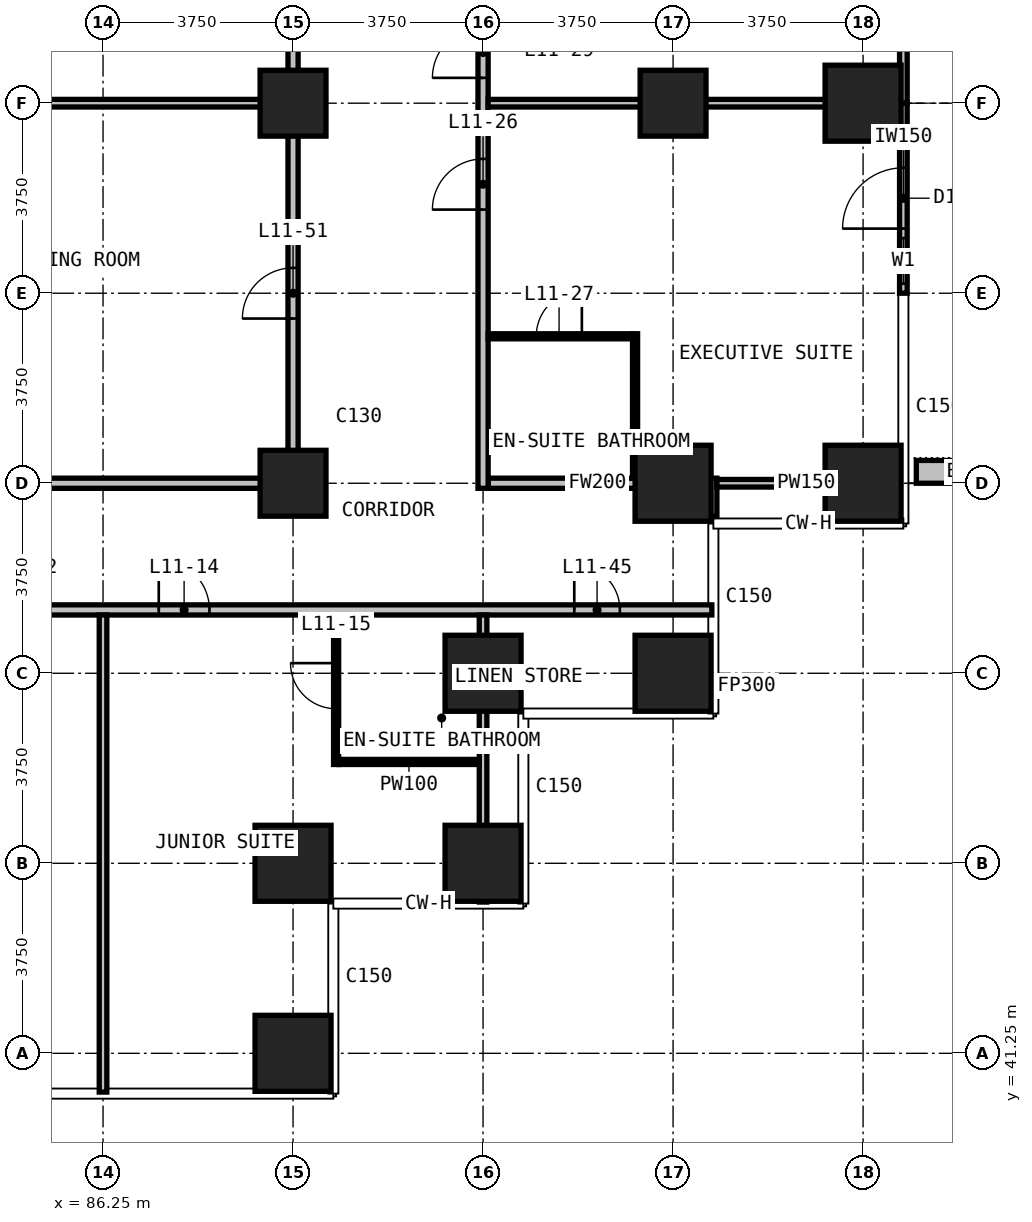
"""IFC4 building model, lengths in metres.
Left out: names, types, materials, properties, quantities, classifications, styles, units other than length and angle.
Written with IfcOpenShell. Run it as: python <this file> out.ifc"""

import sys

from ifc_helpers import new_model, si_unit, direction, frame, frame_2d, origin, origin_2d, place, context, subcontext, project, spatial, rectangle, extrude, element, fill, save


model = new_model("IFC4")
c1 = context("Model", 3, precision=1e-05, world=origin(), true_north=direction((0.0, 1.0)))
c2 = subcontext(c1, "Body", "Model", "MODEL_VIEW")
j1 = project(units=[si_unit("LENGTHUNIT", "METRE"), si_unit("PLANEANGLEUNIT", "RADIAN")], contexts=[c1])
p1 = place(None, origin())
s1 = spatial("IfcSite", under=j1, at=p1, CompositionType="ELEMENT")
p2 = place(p1, origin())
s2 = spatial("IfcBuilding", under=s1, at=p2, CompositionType="ELEMENT")
p3 = place(p2, frame((0.0, 0.0, 56.0)))
s3 = spatial("IfcBuildingStorey", under=s2, at=p3, CompositionType="ELEMENT", Elevation=56.0)
for number, where, z_axis, x_axis in (
    (1, (90.0, 41.25, 0.0), (0.0, 0.0, 1.0), (1.0, 0.0, 0.0)),
    (2, (90.0, 45.0, 0.0), (0.0, 0.0, 1.0), (1.0, 0.0, 0.0)),
):
    element("IfcColumn", number, at=place(p3, frame(where, z_axis=z_axis, x_axis=x_axis)), inside=s3, PredefinedType="COLUMN", context=c2, shape_type="SweptSolid", body=[
        extrude(rectangle(XDim=1.5, YDim=1.5, at=origin_2d()), origin(), (0.0, 0.0, 1.0), 3.3),
    ])
for number, where, z_axis, x_axis in (
    (3, (90.0, 52.5, 0.0), (0.0, 0.0, 1.0), (1.0, 0.0, 0.0)),
    (4, (90.0, 60.0, 0.0), (0.0, 0.0, 1.0), (1.0, 0.0, 0.0)),
):
    element("IfcColumn", number, at=place(p3, frame(where, z_axis=z_axis, x_axis=x_axis)), inside=s3, PredefinedType="COLUMN", context=c2, shape_type="SweptSolid", body=[
        extrude(rectangle(XDim=1.3, YDim=1.3, at=origin_2d()), origin(), (0.0, 0.0, 1.0), 3.3),
    ])
for number, where, z_axis, x_axis in (
    (5, (93.75, 45.0, 0.0), (0.0, 0.0, 1.0), (1.0, 0.0, 0.0)),
    (6, (93.75, 48.75, 0.0), (0.0, 0.0, 1.0), (1.0, 0.0, 0.0)),
    (7, (97.5, 48.75, 0.0), (0.0, 0.0, 1.0), (1.0, 0.0, 0.0)),
    (8, (97.5, 52.5, 0.0), (0.0, 0.0, 1.0), (1.0, 0.0, 0.0)),
):
    element("IfcColumn", number, at=place(p3, frame(where, z_axis=z_axis, x_axis=x_axis)), inside=s3, PredefinedType="COLUMN", context=c2, shape_type="SweptSolid", body=[
        extrude(rectangle(XDim=1.5, YDim=1.5, at=origin_2d()), origin(), (0.0, 0.0, 1.0), 3.3),
    ])
p4 = place(p3, frame((97.5, 60.0, 0.0), z_axis=(0.0, 0.0, 1.0), x_axis=(1.0, 0.0, 0.0)))
e9 = element("IfcColumn", 9, at=p4, inside=s3, PredefinedType="COLUMN", context=c2, shape_type="SweptSolid", body=[
    extrude(rectangle(XDim=1.3, YDim=1.3, at=origin_2d()), origin(), (0.0, 0.0, 1.0), 3.3),
])
for number, where, z_axis, x_axis in (
    (10, (101.25, 52.5, 0.0), (0.0, 0.0, 1.0), (1.0, 0.0, 0.0)),
    (11, (101.25, 60.0, 0.0), (0.0, 0.0, 1.0), (1.0, 0.0, 0.0)),
):
    element("IfcColumn", number, at=place(p3, frame(where, z_axis=z_axis, x_axis=x_axis)), inside=s3, PredefinedType="COLUMN", context=c2, shape_type="SweptSolid", body=[
        extrude(rectangle(XDim=1.5, YDim=1.5, at=origin_2d()), origin(), (0.0, 0.0, 1.0), 3.3),
    ])
p5 = place(p3, frame((102.045, 56.25, 0.0), z_axis=(0.0, 0.0, 1.0), x_axis=(0.0, 1.0, 0.0)))
e12 = element("IfcWall", 12, at=p5, inside=s3, PredefinedType="SOLIDWALL", context=c2, shape_type="SweptSolid", body=[
    extrude(rectangle(XDim=3.75, YDim=0.15, at=frame_2d((1.875, 0.0))), origin(), (0.0, 0.0, 1.0), 3.0),
])
p6 = place(p5, frame((0.188, 0.0, 0.1)))
e13 = element("IfcOpeningElement", 13, at=p6, cuts=e12, PredefinedType="OPENING", context=c2, shape_type="SweptSolid", body=[
    extrude(rectangle(XDim=0.9, YDim=2.4, at=frame_2d((0.45, 1.2))), frame((0.0, 0.085, 0.0), z_axis=(0.0, -1.0, 0.0), x_axis=(1.0, 0.0, 0.0)), (0.0, 0.0, 1.0), 0.17),
])
p7 = place(p5, frame((1.275, 0.0, 0.0)))
e14 = element("IfcOpeningElement", 14, at=p7, cuts=e12, PredefinedType="OPENING", context=c2, shape_type="SweptSolid", body=[
    extrude(rectangle(XDim=1.2, YDim=2.4, at=frame_2d((0.6, 1.2))), frame((0.0, 0.085, 0.0), z_axis=(0.0, -1.0, 0.0), x_axis=(1.0, 0.0, 0.0)), (0.0, 0.0, 1.0), 0.17),
])
p8 = place(p3, frame((102.045, 60.0, 0.0), z_axis=(0.0, 0.0, 1.0), x_axis=(0.0, 1.0, 0.0)))
e15 = element("IfcWall", 15, at=p8, inside=s3, PredefinedType="SOLIDWALL", context=c2, shape_type="SweptSolid", body=[
    extrude(rectangle(XDim=3.75, YDim=0.15, at=frame_2d((1.875, 0.0))), origin(), (0.0, 0.0, 1.0), 3.0),
])
p9 = place(p8, frame((1.275, 0.0, 0.0)))
e16 = element("IfcOpeningElement", 16, at=p9, cuts=e15, PredefinedType="OPENING", context=c2, shape_type="SweptSolid", body=[
    extrude(rectangle(XDim=1.2, YDim=2.4, at=frame_2d((0.6, 1.2))), frame((0.0, 0.085, 0.0), z_axis=(0.0, -1.0, 0.0), x_axis=(1.0, 0.0, 0.0)), (0.0, 0.0, 1.0), 0.17),
])
p10 = place(p8, frame((2.663, 0.0, 0.1)))
e17 = element("IfcOpeningElement", 17, at=p10, cuts=e15, PredefinedType="OPENING", context=c2, shape_type="SweptSolid", body=[
    extrude(rectangle(XDim=0.9, YDim=2.4, at=frame_2d((0.45, 1.2))), frame((0.0, 0.085, 0.0), z_axis=(0.0, -1.0, 0.0), x_axis=(1.0, 0.0, 0.0)), (0.0, 0.0, 1.0), 0.17),
])
p11 = place(p3, frame((102.3, 52.725, 0.0), z_axis=(0.0, 0.0, 1.0), x_axis=(1.0, 0.0, 0.0)))
e18 = element("IfcWall", 18, at=p11, inside=s3, PredefinedType="USERDEFINED", context=c2, shape_type="SweptSolid", body=[
    extrude(rectangle(XDim=2.35, YDim=0.45, at=frame_2d((1.175, 0.0))), origin(), (0.0, 0.0, 1.0), 1.1),
])
p12 = place(p3, frame((51.735, 50.0, 0.0), z_axis=(0.0, 0.0, 1.0), x_axis=(1.0, 0.0, 0.0)))
e19 = element("IfcWall", 19, at=p12, inside=s3, PredefinedType="PARTITIONING", context=c2, shape_type="SweptSolid", body=[
    extrude(rectangle(XDim=46.53, YDim=0.2, at=frame_2d((23.265, 0.0))), origin(), (0.0, 0.0, 1.0), 3.0),
])
p13 = place(p12, frame((5.615, 0.0, 0.0)))
e20 = element("IfcOpeningElement", 20, at=p13, cuts=e19, PredefinedType="OPENING", context=c2, shape_type="SweptSolid", body=[
    extrude(rectangle(XDim=1.0, YDim=2.2, at=frame_2d((0.5, 1.1))), frame((0.0, 0.11, 0.0), z_axis=(0.0, -1.0, 0.0), x_axis=(1.0, 0.0, 0.0)), (0.0, 0.0, 1.0), 0.22),
])
p14 = place(p12, frame((17.415, 0.0, 0.0)))
e21 = element("IfcOpeningElement", 21, at=p14, cuts=e19, PredefinedType="OPENING", context=c2, shape_type="SweptSolid", body=[
    extrude(rectangle(XDim=1.0, YDim=2.2, at=frame_2d((0.5, 1.1))), frame((0.0, 0.11, 0.0), z_axis=(0.0, -1.0, 0.0), x_axis=(1.0, 0.0, 0.0)), (0.0, 0.0, 1.0), 0.22),
])
p15 = place(p12, frame((20.615, 0.0, 0.0)))
e22 = element("IfcOpeningElement", 22, at=p15, cuts=e19, PredefinedType="OPENING", context=c2, shape_type="SweptSolid", body=[
    extrude(rectangle(XDim=1.0, YDim=2.2, at=frame_2d((0.5, 1.1))), frame((0.0, 0.11, 0.0), z_axis=(0.0, -1.0, 0.0), x_axis=(1.0, 0.0, 0.0)), (0.0, 0.0, 1.0), 0.22),
])
p16 = place(p12, frame((32.415, 0.0, 0.0)))
e23 = element("IfcOpeningElement", 23, at=p16, cuts=e19, PredefinedType="OPENING", context=c2, shape_type="SweptSolid", body=[
    extrude(rectangle(XDim=1.0, YDim=2.2, at=frame_2d((0.5, 1.1))), frame((0.0, 0.11, 0.0), z_axis=(0.0, -1.0, 0.0), x_axis=(1.0, 0.0, 0.0)), (0.0, 0.0, 1.0), 0.22),
])
p17 = place(p12, frame((35.615, 0.0, 0.0)))
e24 = element("IfcOpeningElement", 24, at=p17, cuts=e19, PredefinedType="OPENING", context=c2, shape_type="SweptSolid", body=[
    extrude(rectangle(XDim=1.0, YDim=2.2, at=frame_2d((0.5, 1.1))), frame((0.0, 0.11, 0.0), z_axis=(0.0, -1.0, 0.0), x_axis=(1.0, 0.0, 0.0)), (0.0, 0.0, 1.0), 0.22),
])
p18 = place(p12, frame((1.8, 0.0, 0.0)))
e25 = element("IfcOpeningElement", 25, at=p18, cuts=e19, PredefinedType="OPENING", context=c2, shape_type="SweptSolid", body=[
    extrude(rectangle(XDim=0.9, YDim=2.2, at=frame_2d((0.45, 1.1))), frame((0.0, 0.11, 0.0), z_axis=(0.0, -1.0, 0.0), x_axis=(1.0, 0.0, 0.0)), (0.0, 0.0, 1.0), 0.22),
])
p19 = place(p12, frame((43.815, 0.0, 0.0)))
e26 = element("IfcOpeningElement", 26, at=p19, cuts=e19, PredefinedType="OPENING", context=c2, shape_type="SweptSolid", body=[
    extrude(rectangle(XDim=0.9, YDim=2.2, at=frame_2d((0.45, 1.1))), frame((0.0, 0.11, 0.0), z_axis=(0.0, -1.0, 0.0), x_axis=(1.0, 0.0, 0.0)), (0.0, 0.0, 1.0), 0.22),
])
p20 = place(p3, frame((60.1, 52.5, 0.0), z_axis=(0.0, 0.0, 1.0), x_axis=(1.0, 0.0, 0.0)))
e27 = element("IfcWall", 27, at=p20, inside=s3, PredefinedType="PARTITIONING", context=c2, shape_type="SweptSolid", body=[
    extrude(rectangle(XDim=29.8, YDim=0.2, at=frame_2d((14.9, 0.0))), origin(), (0.0, 0.0, 1.0), 3.0),
])
p21 = place(p20, frame((10.65, 0.0, 0.0)))
e28 = element("IfcOpeningElement", 28, at=p21, cuts=e27, PredefinedType="OPENING", context=c2, shape_type="SweptSolid", body=[
    extrude(rectangle(XDim=1.0, YDim=2.2, at=frame_2d((0.5, 1.1))), frame((0.0, 0.11, 0.0), z_axis=(0.0, -1.0, 0.0), x_axis=(1.0, 0.0, 0.0)), (0.0, 0.0, 1.0), 0.22),
])
p22 = place(p20, frame((18.15, 0.0, 0.0)))
e29 = element("IfcOpeningElement", 29, at=p22, cuts=e27, PredefinedType="OPENING", context=c2, shape_type="SweptSolid", body=[
    extrude(rectangle(XDim=1.0, YDim=2.2, at=frame_2d((0.5, 1.1))), frame((0.0, 0.11, 0.0), z_axis=(0.0, -1.0, 0.0), x_axis=(1.0, 0.0, 0.0)), (0.0, 0.0, 1.0), 0.22),
])
p23 = place(p3, frame((93.85, 52.5, 0.0), z_axis=(0.0, 0.0, 1.0), x_axis=(1.0, 0.0, 0.0)))
e30 = element("IfcWall", 30, at=p23, inside=s3, PredefinedType="PARTITIONING", context=c2, shape_type="SweptSolid", body=[
    extrude(rectangle(XDim=4.315, YDim=0.2, at=frame_2d((2.157, 0.0))), origin(), (0.0, 0.0, 1.0), 3.0),
])
p24 = place(p3, frame((90.0, 52.4, 0.0), z_axis=(0.0, 0.0, 1.0), x_axis=(0.0, 1.0, 0.0)))
e31 = element("IfcWall", 31, at=p24, inside=s3, PredefinedType="PARTITIONING", context=c2, shape_type="SweptSolid", body=[
    extrude(rectangle(XDim=18.84, YDim=0.2, at=frame_2d((9.42, 0.0))), origin(), (0.0, 0.0, 1.0), 3.0),
])
p25 = place(p24, frame((3.35, 0.0, 0.0)))
e32 = element("IfcOpeningElement", 32, at=p25, cuts=e31, PredefinedType="OPENING", context=c2, shape_type="SweptSolid", body=[
    extrude(rectangle(XDim=1.0, YDim=2.2, at=frame_2d((0.5, 1.1))), frame((0.0, 0.11, 0.0), z_axis=(0.0, -1.0, 0.0), x_axis=(1.0, 0.0, 0.0)), (0.0, 0.0, 1.0), 0.22),
])
p26 = place(p24, frame((12.3, 0.0, 0.0)))
e33 = element("IfcOpeningElement", 33, at=p26, cuts=e31, PredefinedType="OPENING", context=c2, shape_type="SweptSolid", body=[
    extrude(rectangle(XDim=1.8, YDim=2.2, at=frame_2d((0.9, 1.1))), frame((0.0, 0.11, 0.0), z_axis=(0.0, -1.0, 0.0), x_axis=(1.0, 0.0, 0.0)), (0.0, 0.0, 1.0), 0.22),
])
p27 = place(p3, frame((93.75, 52.4, 0.0), z_axis=(0.0, 0.0, 1.0), x_axis=(0.0, 1.0, 0.0)))
e34 = element("IfcWall", 34, at=p27, inside=s3, PredefinedType="PARTITIONING", context=c2, shape_type="SweptSolid", body=[
    extrude(rectangle(XDim=38.31, YDim=0.2, at=frame_2d((19.155, 0.0))), origin(), (0.0, 0.0, 1.0), 3.0),
])
p28 = place(p27, frame((5.5, 0.0, 0.0)))
e35 = element("IfcOpeningElement", 35, at=p28, cuts=e34, PredefinedType="OPENING", context=c2, shape_type="SweptSolid", body=[
    extrude(rectangle(XDim=1.0, YDim=2.2, at=frame_2d((0.5, 1.1))), frame((0.0, 0.11, 0.0), z_axis=(0.0, -1.0, 0.0), x_axis=(1.0, 0.0, 0.0)), (0.0, 0.0, 1.0), 0.22),
])
p29 = place(p27, frame((8.1, 0.0, 0.0)))
e36 = element("IfcOpeningElement", 36, at=p29, cuts=e34, PredefinedType="OPENING", context=c2, shape_type="SweptSolid", body=[
    extrude(rectangle(XDim=1.0, YDim=2.2, at=frame_2d((0.5, 1.1))), frame((0.0, 0.11, 0.0), z_axis=(0.0, -1.0, 0.0), x_axis=(1.0, 0.0, 0.0)), (0.0, 0.0, 1.0), 0.22),
])
p30 = place(p27, frame((13.6, 0.0, 0.0)))
e37 = element("IfcOpeningElement", 37, at=p30, cuts=e34, PredefinedType="OPENING", context=c2, shape_type="SweptSolid", body=[
    extrude(rectangle(XDim=1.0, YDim=2.2, at=frame_2d((0.5, 1.1))), frame((0.0, 0.11, 0.0), z_axis=(0.0, -1.0, 0.0), x_axis=(1.0, 0.0, 0.0)), (0.0, 0.0, 1.0), 0.22),
])
p31 = place(p27, frame((16.2, 0.0, 0.0)))
e38 = element("IfcOpeningElement", 38, at=p31, cuts=e34, PredefinedType="OPENING", context=c2, shape_type="SweptSolid", body=[
    extrude(rectangle(XDim=1.0, YDim=2.2, at=frame_2d((0.5, 1.1))), frame((0.0, 0.11, 0.0), z_axis=(0.0, -1.0, 0.0), x_axis=(1.0, 0.0, 0.0)), (0.0, 0.0, 1.0), 0.22),
])
p32 = place(p27, frame((24.85, 0.0, 0.0)))
e39 = element("IfcOpeningElement", 39, at=p32, cuts=e34, PredefinedType="OPENING", context=c2, shape_type="SweptSolid", body=[
    extrude(rectangle(XDim=1.0, YDim=2.2, at=frame_2d((0.5, 1.1))), frame((0.0, 0.11, 0.0), z_axis=(0.0, -1.0, 0.0), x_axis=(1.0, 0.0, 0.0)), (0.0, 0.0, 1.0), 0.22),
])
p33 = place(p27, frame((26.85, 0.0, 0.0)))
e40 = element("IfcOpeningElement", 40, at=p33, cuts=e34, PredefinedType="OPENING", context=c2, shape_type="SweptSolid", body=[
    extrude(rectangle(XDim=1.0, YDim=2.2, at=frame_2d((0.5, 1.1))), frame((0.0, 0.11, 0.0), z_axis=(0.0, -1.0, 0.0), x_axis=(1.0, 0.0, 0.0)), (0.0, 0.0, 1.0), 0.22),
])
p34 = place(p27, frame((31.55, 0.0, 0.0)))
e41 = element("IfcOpeningElement", 41, at=p34, cuts=e34, PredefinedType="OPENING", context=c2, shape_type="SweptSolid", body=[
    extrude(rectangle(XDim=0.9, YDim=2.2, at=frame_2d((0.45, 1.1))), frame((0.0, 0.11, 0.0), z_axis=(0.0, -1.0, 0.0), x_axis=(1.0, 0.0, 0.0)), (0.0, 0.0, 1.0), 0.22),
])
p35 = place(p27, frame((35.65, 0.0, 0.0)))
e42 = element("IfcOpeningElement", 42, at=p35, cuts=e34, PredefinedType="OPENING", context=c2, shape_type="SweptSolid", body=[
    extrude(rectangle(XDim=0.9, YDim=2.2, at=frame_2d((0.45, 1.1))), frame((0.0, 0.11, 0.0), z_axis=(0.0, -1.0, 0.0), x_axis=(1.0, 0.0, 0.0)), (0.0, 0.0, 1.0), 0.22),
])
p36 = place(p3, frame((98.265, 51.855, 0.0), z_axis=(0.0, 0.0, 1.0), x_axis=(0.0, 1.0, 0.0)))
e43 = element("IfcWall", 43, at=p36, inside=s3, PredefinedType="PARTITIONING", context=c2, shape_type="SweptSolid", body=[
    extrude(rectangle(XDim=0.745, YDim=0.2, at=frame_2d((0.373, 0.0))), origin(), (0.0, 0.0, 1.0), 3.0),
])
p37 = place(p3, frame((98.365, 52.5, 0.0), z_axis=(0.0, 0.0, 1.0), x_axis=(1.0, 0.0, 0.0)))
e44 = element("IfcWall", 44, at=p37, inside=s3, PredefinedType="PARTITIONING", context=c2, shape_type="SweptSolid", body=[
    extrude(rectangle(XDim=3.53, YDim=0.15, at=frame_2d((1.765, 0.0))), origin(), (0.0, 0.0, 1.0), 3.0),
])
p38 = place(p3, frame((60.1, 60.0, 0.0), z_axis=(0.0, 0.0, 1.0), x_axis=(1.0, 0.0, 0.0)))
e45 = element("IfcWall", 45, at=p38, inside=s3, PredefinedType="PARTITIONING", context=c2, shape_type="SweptSolid", body=[
    extrude(rectangle(XDim=29.8, YDim=0.15, at=frame_2d((14.9, 0.0))), origin(), (0.0, 0.0, 1.0), 3.0),
])
p39 = place(p3, frame((93.85, 60.0, 0.0), z_axis=(0.0, 0.0, 1.0), x_axis=(1.0, 0.0, 0.0)))
e46 = element("IfcWall", 46, at=p39, inside=s3, PredefinedType="PARTITIONING", context=c2, shape_type="SweptSolid", body=[
    extrude(rectangle(XDim=8.11, YDim=0.15, at=frame_2d((4.055, 0.0))), origin(), (0.0, 0.0, 1.0), 3.0),
])
p40 = place(p3, frame((86.25, 40.485, 0.0), z_axis=(0.0, 0.0, 1.0), x_axis=(0.0, 1.0, 0.0)))
e47 = element("IfcWall", 47, at=p40, inside=s3, PredefinedType="PARTITIONING", context=c2, shape_type="SweptSolid", body=[
    extrude(rectangle(XDim=9.415, YDim=0.15, at=frame_2d((4.708, 0.0))), origin(), (0.0, 0.0, 1.0), 3.0),
])
p41 = place(p3, frame((93.75, 44.235, 0.0), z_axis=(0.0, 0.0, 1.0), x_axis=(0.0, 1.0, 0.0)))
e48 = element("IfcWall", 48, at=p41, inside=s3, PredefinedType="PARTITIONING", context=c2, shape_type="SweptSolid", body=[
    extrude(rectangle(XDim=5.665, YDim=0.15, at=frame_2d((2.833, 0.0))), origin(), (0.0, 0.0, 1.0), 3.0),
])
p42 = place(p3, frame((90.9, 47.0, 0.0), z_axis=(0.0, 0.0, 1.0), x_axis=(1.0, 0.0, 0.0)))
e49 = element("IfcWall", 49, at=p42, inside=s3, PredefinedType="PARTITIONING", context=c2, shape_type="SweptSolid", body=[
    extrude(rectangle(XDim=2.775, YDim=0.1, at=frame_2d((1.388, 0.0))), origin(), (0.0, 0.0, 1.0), 3.0),
])
p43 = place(p3, frame((93.85, 55.4, 0.0), z_axis=(0.0, 0.0, 1.0), x_axis=(1.0, 0.0, 0.0)))
e50 = element("IfcWall", 50, at=p43, inside=s3, PredefinedType="PARTITIONING", context=c2, shape_type="SweptSolid", body=[
    extrude(rectangle(XDim=2.85, YDim=0.1, at=frame_2d((1.425, 0.0))), origin(), (0.0, 0.0, 1.0), 3.0),
])
p44 = place(p43, frame((0.95, 0.0, 0.0)))
e51 = element("IfcOpeningElement", 51, at=p44, cuts=e50, PredefinedType="OPENING", context=c2, shape_type="SweptSolid", body=[
    extrude(rectangle(XDim=0.9, YDim=2.2, at=frame_2d((0.45, 1.1))), frame((0.0, 0.06, 0.0), z_axis=(0.0, -1.0, 0.0), x_axis=(1.0, 0.0, 0.0)), (0.0, 0.0, 1.0), 0.12),
])
p45 = place(p3, frame((90.85, 46.95, 0.0), z_axis=(0.0, 0.0, 1.0), x_axis=(0.0, 1.0, 0.0)))
e52 = element("IfcWall", 52, at=p45, inside=s3, PredefinedType="PARTITIONING", context=c2, shape_type="SweptSolid", body=[
    extrude(rectangle(XDim=2.95, YDim=0.1, at=frame_2d((1.475, 0.0))), origin(), (0.0, 0.0, 1.0), 3.0),
])
p46 = place(p45, frame((1.1, 0.0, 0.0)))
e53 = element("IfcOpeningElement", 53, at=p46, cuts=e52, PredefinedType="OPENING", context=c2, shape_type="SweptSolid", body=[
    extrude(rectangle(XDim=0.9, YDim=2.2, at=frame_2d((0.45, 1.1))), frame((0.0, 0.06, 0.0), z_axis=(0.0, -1.0, 0.0), x_axis=(1.0, 0.0, 0.0)), (0.0, 0.0, 1.0), 0.12),
])
p47 = place(p3, frame((96.75, 52.6, 0.0), z_axis=(0.0, 0.0, 1.0), x_axis=(0.0, 1.0, 0.0)))
e54 = element("IfcWall", 54, at=p47, inside=s3, PredefinedType="PARTITIONING", context=c2, shape_type="SweptSolid", body=[
    extrude(rectangle(XDim=2.85, YDim=0.1, at=frame_2d((1.425, 0.0))), origin(), (0.0, 0.0, 1.0), 3.0),
])
p48 = place(p6, origin())
e55 = element("IfcWindow", 55, at=p48, inside=s3, PartitioningType="SINGLE_PANEL", PredefinedType="WINDOW", context=c2, shape_type="SweptSolid", body=[
    extrude(rectangle(XDim=0.9, YDim=2.4, at=frame_2d((0.45, 1.2))), frame((0.0, 0.03, 0.0), z_axis=(0.0, -1.0, 0.0), x_axis=(1.0, 0.0, 0.0)), (0.0, 0.0, 1.0), 0.06),
])
fill(e13, e55)
p49 = place(p7, origin())
e56 = element("IfcDoor", 56, at=p49, inside=s3, OperationType="SINGLE_SWING_LEFT", PredefinedType="DOOR", context=c2, shape_type="SweptSolid", body=[
    extrude(rectangle(XDim=1.2, YDim=2.4, at=frame_2d((0.6, 1.2))), frame((0.0, 0.025, 0.0), z_axis=(0.0, -1.0, 0.0), x_axis=(1.0, 0.0, 0.0)), (0.0, 0.0, 1.0), 0.05),
])
fill(e14, e56)
p50 = place(p17, origin())
e57 = element("IfcDoor", 57, at=p50, inside=s3, OperationType="SINGLE_SWING_LEFT", PredefinedType="DOOR", context=c2, shape_type="SweptSolid", body=[
    extrude(rectangle(XDim=1.0, YDim=2.2, at=frame_2d((0.5, 1.1))), frame((0.0, 0.025, 0.0), z_axis=(0.0, -1.0, 0.0), x_axis=(1.0, 0.0, 0.0)), (0.0, 0.0, 1.0), 0.05),
])
fill(e24, e57)
p51 = place(p46, origin())
e58 = element("IfcDoor", 58, at=p51, inside=s3, OperationType="SINGLE_SWING_RIGHT", PredefinedType="DOOR", context=c2, shape_type="SweptSolid", body=[
    extrude(rectangle(XDim=0.9, YDim=2.2, at=frame_2d((0.45, 1.1))), frame((0.0, 0.025, 0.0), z_axis=(0.0, -1.0, 0.0), x_axis=(1.0, 0.0, 0.0)), (0.0, 0.0, 1.0), 0.05),
])
fill(e53, e58)
p52 = place(p28, origin())
e59 = element("IfcDoor", 59, at=p52, inside=s3, OperationType="SINGLE_SWING_LEFT", PredefinedType="DOOR", context=c2, shape_type="SweptSolid", body=[
    extrude(rectangle(XDim=1.0, YDim=2.2, at=frame_2d((0.5, 1.1))), frame((0.0, 0.025, 0.0), z_axis=(0.0, -1.0, 0.0), x_axis=(1.0, 0.0, 0.0)), (0.0, 0.0, 1.0), 0.05),
])
fill(e35, e59)
p53 = place(p44, origin())
e60 = element("IfcDoor", 60, at=p53, inside=s3, OperationType="SINGLE_SWING_RIGHT", PredefinedType="DOOR", context=c2, shape_type="SweptSolid", body=[
    extrude(rectangle(XDim=0.9, YDim=2.2, at=frame_2d((0.45, 1.1))), frame((0.0, 0.025, 0.0), z_axis=(0.0, -1.0, 0.0), x_axis=(1.0, 0.0, 0.0)), (0.0, 0.0, 1.0), 0.05),
])
fill(e51, e60)
p54 = place(p29, origin())
e61 = element("IfcDoor", 61, at=p54, inside=s3, OperationType="SINGLE_SWING_RIGHT", PredefinedType="DOOR", context=c2, shape_type="SweptSolid", body=[
    extrude(rectangle(XDim=1.0, YDim=2.2, at=frame_2d((0.5, 1.1))), frame((0.0, 0.025, 0.0), z_axis=(0.0, -1.0, 0.0), x_axis=(1.0, 0.0, 0.0)), (0.0, 0.0, 1.0), 0.05),
])
fill(e36, e61)
p55 = place(p19, origin())
e62 = element("IfcDoor", 62, at=p55, inside=s3, OperationType="SINGLE_SWING_LEFT", PredefinedType="DOOR", context=c2, shape_type="SweptSolid", body=[
    extrude(rectangle(XDim=0.9, YDim=2.2, at=frame_2d((0.45, 1.1))), frame((0.0, 0.025, 0.0), z_axis=(0.0, -1.0, 0.0), x_axis=(1.0, 0.0, 0.0)), (0.0, 0.0, 1.0), 0.05),
])
fill(e26, e62)
p56 = place(p25, origin())
e63 = element("IfcDoor", 63, at=p56, inside=s3, OperationType="SINGLE_SWING_RIGHT", PredefinedType="DOOR", context=c2, shape_type="SweptSolid", body=[
    extrude(rectangle(XDim=1.0, YDim=2.2, at=frame_2d((0.5, 1.1))), frame((0.0, 0.025, 0.0), z_axis=(0.0, -1.0, 0.0), x_axis=(1.0, 0.0, 0.0)), (0.0, 0.0, 1.0), 0.05),
])
fill(e32, e63)
save(model, sys.argv[1])
